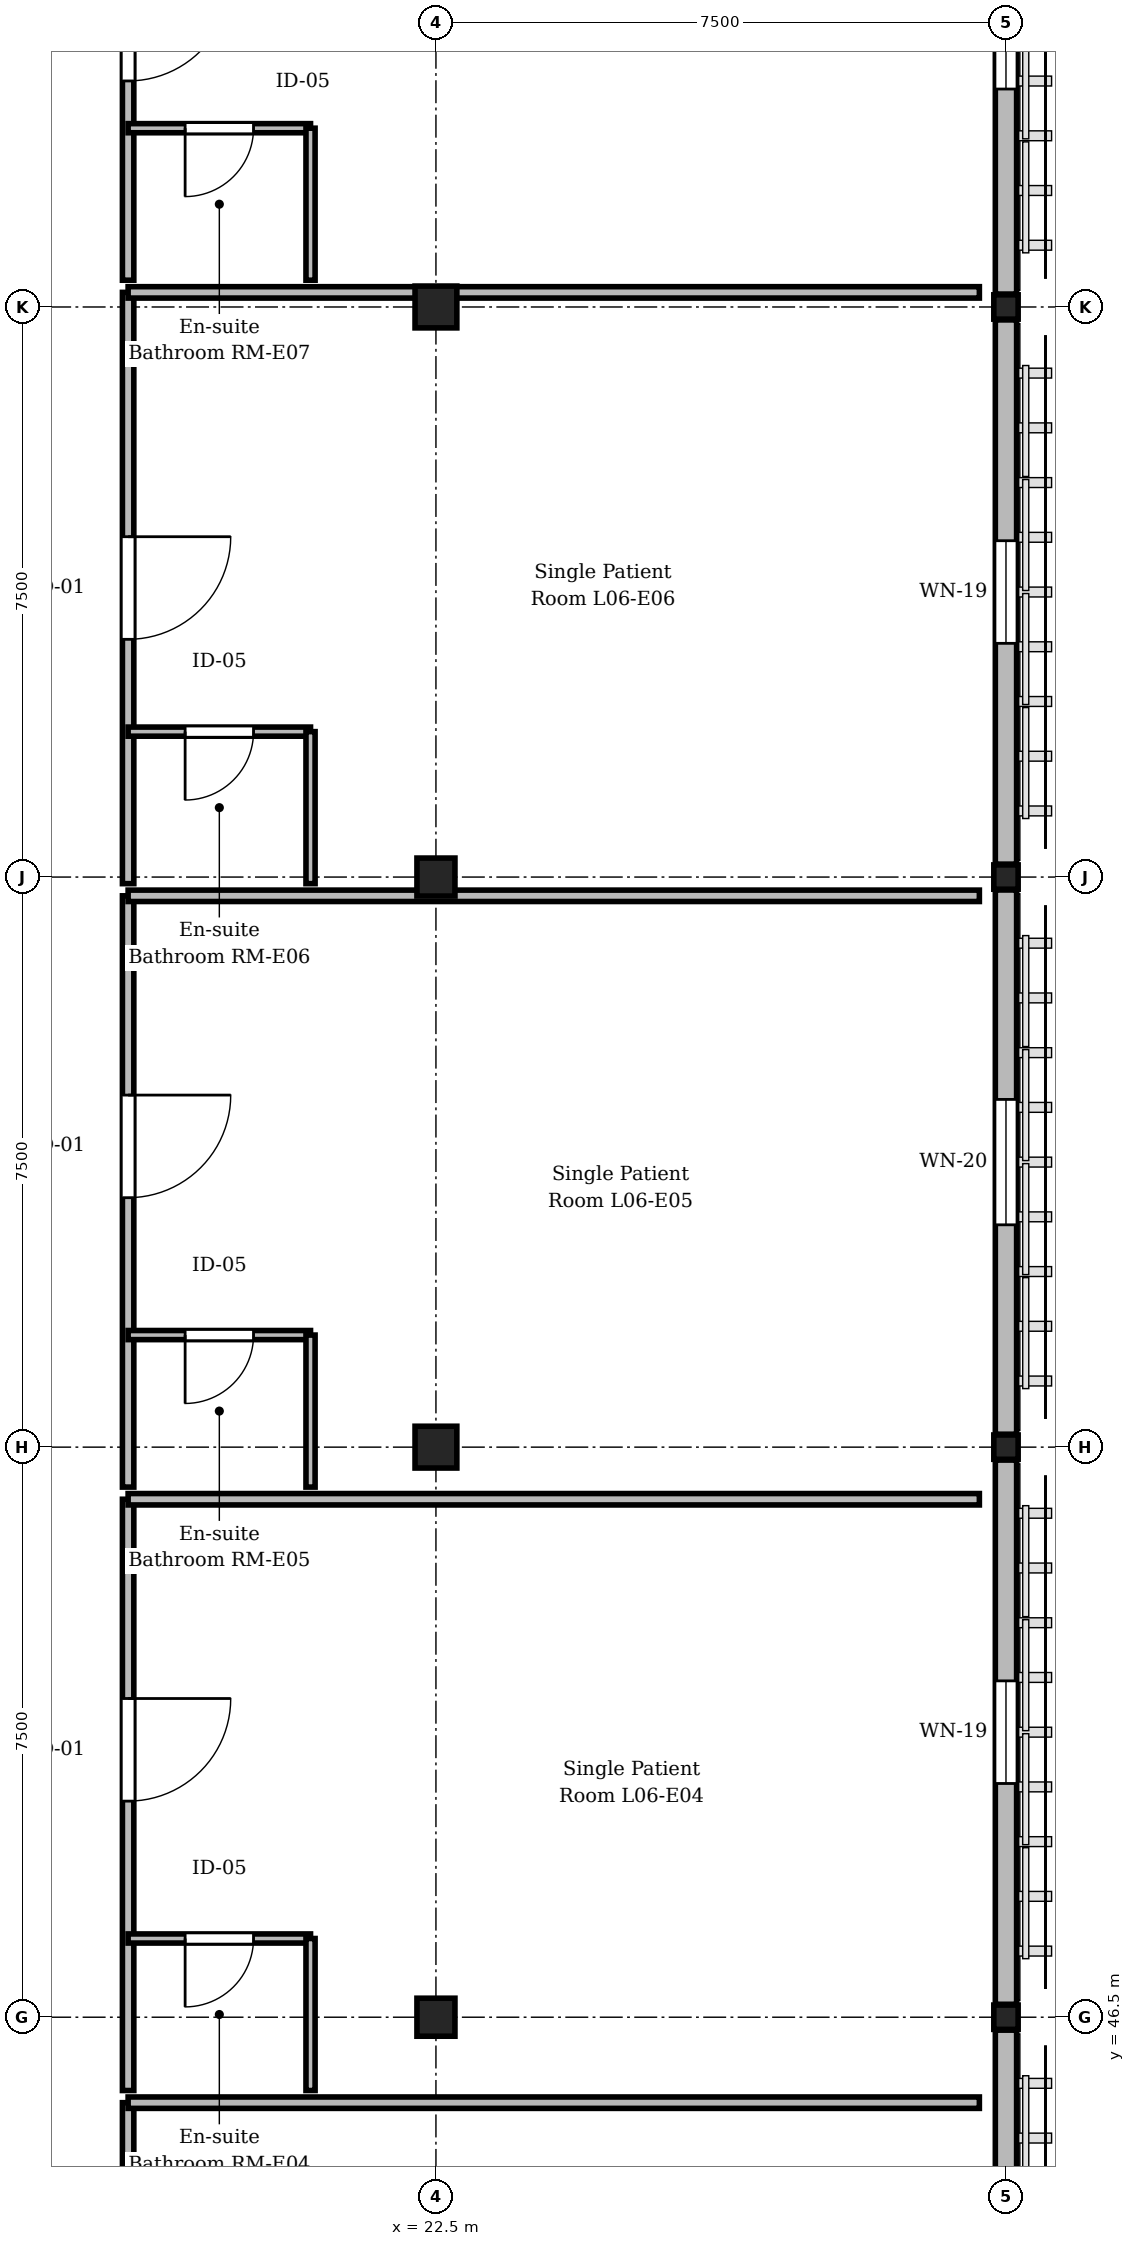
"""IFC4 building model, lengths in metres.
Left out: names, types, materials, properties, quantities, classifications, styles, units other than length and angle.
Written with IfcOpenShell. Run it as: python <this file> out.ifc"""

import sys

from ifc_helpers import new_model, si_unit, direction, frame, frame_2d, origin, origin_2d, place, context, subcontext, project, spatial, rectangle, extrude, element, fill, save


model = new_model("IFC4")
c1 = context("Model", 3, precision=1e-05, world=origin(), true_north=direction((0.0, 1.0)))
c2 = subcontext(c1, "Body", "Model", "MODEL_VIEW")
j1 = project(units=[si_unit("LENGTHUNIT", "METRE"), si_unit("PLANEANGLEUNIT", "RADIAN")], contexts=[c1])
p1 = place(None, origin())
s1 = spatial("IfcSite", under=j1, at=p1, CompositionType="ELEMENT")
p2 = place(p1, origin())
s2 = spatial("IfcBuilding", under=s1, at=p2, CompositionType="ELEMENT")
p3 = place(p2, frame((0.0, 0.0, 25.95)))
s3 = spatial("IfcBuildingStorey", under=s2, at=p3, CompositionType="ELEMENT", Elevation=25.95)
p4 = place(p3, frame((22.5, 46.5, 0.0), z_axis=(0.0, 0.0, 1.0), x_axis=(1.0, 0.0, 0.0)))
e1 = element("IfcColumn", 1, at=p4, inside=s3, PredefinedType="COLUMN", context=c2, shape_type="SweptSolid", body=[
    extrude(rectangle(XDim=0.5, YDim=0.5, at=origin_2d()), origin(), (0.0, 0.0, 1.0), 4.05),
])
p5 = place(p3, frame((22.5, 54.0, 0.0), z_axis=(0.0, 0.0, 1.0), x_axis=(1.0, 0.0, 0.0)))
e2 = element("IfcColumn", 2, at=p5, inside=s3, PredefinedType="COLUMN", context=c2, shape_type="SweptSolid", body=[
    extrude(rectangle(XDim=0.55, YDim=0.55, at=origin_2d()), origin(), (0.0, 0.0, 1.0), 4.05),
])
p6 = place(p3, frame((22.5, 61.5, 0.0), z_axis=(0.0, 0.0, 1.0), x_axis=(1.0, 0.0, 0.0)))
e3 = element("IfcColumn", 3, at=p6, inside=s3, PredefinedType="COLUMN", context=c2, shape_type="SweptSolid", body=[
    extrude(rectangle(XDim=0.5, YDim=0.5, at=origin_2d()), origin(), (0.0, 0.0, 1.0), 4.05),
])
p7 = place(p3, frame((22.5, 69.0, 0.0), z_axis=(0.0, 0.0, 1.0), x_axis=(1.0, 0.0, 0.0)))
e4 = element("IfcColumn", 4, at=p7, inside=s3, PredefinedType="COLUMN", context=c2, shape_type="SweptSolid", body=[
    extrude(rectangle(XDim=0.55, YDim=0.55, at=origin_2d()), origin(), (0.0, 0.0, 1.0), 4.05),
])
for number, where, z_axis, x_axis in (
    (5, (30.0, 46.5, 0.0), (0.0, 0.0, 1.0), (1.0, 0.0, 0.0)),
    (6, (30.0, 54.0, 0.0), (0.0, 0.0, 1.0), (1.0, 0.0, 0.0)),
    (7, (30.0, 61.5, 0.0), (0.0, 0.0, 1.0), (1.0, 0.0, 0.0)),
    (8, (30.0, 69.0, 0.0), (0.0, 0.0, 1.0), (1.0, 0.0, 0.0)),
):
    element("IfcColumn", number, at=place(p3, frame(where, z_axis=z_axis, x_axis=x_axis)), inside=s3, PredefinedType="COLUMN", context=c2, shape_type="SweptSolid", body=[
        extrude(rectangle(XDim=0.32, YDim=0.32, at=origin_2d()), origin(), (0.0, 0.0, 1.0), 4.05),
    ])
p8 = place(p3, frame((30.0, 46.33, 0.0), z_axis=(0.0, 0.0, 1.0), x_axis=(0.0, -1.0, 0.0)))
e9 = element("IfcWall", 9, at=p8, inside=s3, PredefinedType="STANDARD", context=c2, shape_type="SweptSolid", body=[
    extrude(rectangle(XDim=7.16, YDim=0.28, at=frame_2d((3.58, 0.0))), origin(), (0.0, 0.0, 1.0), 3.17),
])
p9 = place(p8, frame((2.755, 0.0, 0.85)))
e10 = element("IfcOpeningElement", 10, at=p9, cuts=e9, PredefinedType="OPENING", context=c2, shape_type="SweptSolid", body=[
    extrude(rectangle(XDim=1.65, YDim=2.04, at=frame_2d((0.825, 1.02))), frame((0.0, 0.15, 0.0), z_axis=(0.0, -1.0, 0.0), x_axis=(1.0, 0.0, 0.0)), (0.0, 0.0, 1.0), 0.3),
])
p10 = place(p3, frame((30.0, 53.83, 0.0), z_axis=(0.0, 0.0, 1.0), x_axis=(0.0, -1.0, 0.0)))
e11 = element("IfcWall", 11, at=p10, inside=s3, PredefinedType="STANDARD", context=c2, shape_type="SweptSolid", body=[
    extrude(rectangle(XDim=7.16, YDim=0.28, at=frame_2d((3.58, 0.0))), origin(), (0.0, 0.0, 1.0), 3.17),
])
p11 = place(p10, frame((2.905, 0.0, 0.85)))
e12 = element("IfcOpeningElement", 12, at=p11, cuts=e11, PredefinedType="OPENING", context=c2, shape_type="SweptSolid", body=[
    extrude(rectangle(XDim=1.35, YDim=2.04, at=frame_2d((0.675, 1.02))), frame((0.0, 0.15, 0.0), z_axis=(0.0, -1.0, 0.0), x_axis=(1.0, 0.0, 0.0)), (0.0, 0.0, 1.0), 0.3),
])
p12 = place(p3, frame((30.0, 61.33, 0.0), z_axis=(0.0, 0.0, 1.0), x_axis=(0.0, -1.0, 0.0)))
e13 = element("IfcWall", 13, at=p12, inside=s3, PredefinedType="STANDARD", context=c2, shape_type="SweptSolid", body=[
    extrude(rectangle(XDim=7.16, YDim=0.28, at=frame_2d((3.58, 0.0))), origin(), (0.0, 0.0, 1.0), 3.17),
])
p13 = place(p12, frame((2.755, 0.0, 0.85)))
e14 = element("IfcOpeningElement", 14, at=p13, cuts=e13, PredefinedType="OPENING", context=c2, shape_type="SweptSolid", body=[
    extrude(rectangle(XDim=1.65, YDim=2.04, at=frame_2d((0.825, 1.02))), frame((0.0, 0.15, 0.0), z_axis=(0.0, -1.0, 0.0), x_axis=(1.0, 0.0, 0.0)), (0.0, 0.0, 1.0), 0.3),
])
p14 = place(p3, frame((30.0, 68.83, 0.0), z_axis=(0.0, 0.0, 1.0), x_axis=(0.0, -1.0, 0.0)))
e15 = element("IfcWall", 15, at=p14, inside=s3, PredefinedType="STANDARD", context=c2, shape_type="SweptSolid", body=[
    extrude(rectangle(XDim=7.16, YDim=0.28, at=frame_2d((3.58, 0.0))), origin(), (0.0, 0.0, 1.0), 3.17),
])
p15 = place(p14, frame((2.905, 0.0, 0.85)))
e16 = element("IfcOpeningElement", 16, at=p15, cuts=e15, PredefinedType="OPENING", context=c2, shape_type="SweptSolid", body=[
    extrude(rectangle(XDim=1.35, YDim=2.04, at=frame_2d((0.675, 1.02))), frame((0.0, 0.15, 0.0), z_axis=(0.0, -1.0, 0.0), x_axis=(1.0, 0.0, 0.0)), (0.0, 0.0, 1.0), 0.3),
])
p16 = place(p3, frame((30.0, 76.215, 0.0), z_axis=(0.0, 0.0, 1.0), x_axis=(0.0, -1.0, 0.0)))
e17 = element("IfcWall", 17, at=p16, inside=s3, PredefinedType="STANDARD", context=c2, shape_type="SweptSolid", body=[
    extrude(rectangle(XDim=7.045, YDim=0.28, at=frame_2d((3.522, 0.0))), origin(), (0.0, 0.0, 1.0), 3.17),
])
p17 = place(p16, frame((2.698, 0.0, 0.85)))
e18 = element("IfcOpeningElement", 18, at=p17, cuts=e17, PredefinedType="OPENING", context=c2, shape_type="SweptSolid", body=[
    extrude(rectangle(XDim=1.65, YDim=2.04, at=frame_2d((0.825, 1.02))), frame((0.0, 0.15, 0.0), z_axis=(0.0, -1.0, 0.0), x_axis=(1.0, 0.0, 0.0)), (0.0, 0.0, 1.0), 0.3),
])
p18 = place(p3, frame((18.45, 45.375, 0.0), z_axis=(0.0, 0.0, 1.0), x_axis=(0.0, -1.0, 0.0)))
e19 = element("IfcWall", 19, at=p18, inside=s3, PredefinedType="PARTITIONING", context=c2, shape_type="SweptSolid", body=[
    extrude(rectangle(XDim=7.779, YDim=0.15, at=frame_2d((3.889, 0.0))), origin(), (0.0, 0.0, 1.0), 3.755),
])
p19 = place(p18, frame((2.029, 0.0, 0.0)))
e20 = element("IfcOpeningElement", 20, at=p19, cuts=e19, PredefinedType="OPENING", context=c2, shape_type="SweptSolid", body=[
    extrude(rectangle(XDim=1.35, YDim=2.25, at=frame_2d((0.675, 1.125))), frame((0.0, 0.085, 0.0), z_axis=(0.0, -1.0, 0.0), x_axis=(1.0, 0.0, 0.0)), (0.0, 0.0, 1.0), 0.17),
])
p20 = place(p3, frame((18.45, 53.314, 0.0), z_axis=(0.0, 0.0, 1.0), x_axis=(0.0, -1.0, 0.0)))
e21 = element("IfcWall", 21, at=p20, inside=s3, PredefinedType="PARTITIONING", context=c2, shape_type="SweptSolid", body=[
    extrude(rectangle(XDim=7.779, YDim=0.15, at=frame_2d((3.889, 0.0))), origin(), (0.0, 0.0, 1.0), 3.755),
])
p21 = place(p20, frame((2.622, 0.0, 0.0)))
e22 = element("IfcOpeningElement", 22, at=p21, cuts=e21, PredefinedType="OPENING", context=c2, shape_type="SweptSolid", body=[
    extrude(rectangle(XDim=1.35, YDim=2.25, at=frame_2d((0.675, 1.125))), frame((0.0, 0.085, 0.0), z_axis=(0.0, -1.0, 0.0), x_axis=(1.0, 0.0, 0.0)), (0.0, 0.0, 1.0), 0.17),
])
p22 = place(p3, frame((20.85, 47.536, 0.0), z_axis=(0.0, 0.0, 1.0), x_axis=(-1.0, 0.0, 0.0)))
e23 = element("IfcWall", 23, at=p22, inside=s3, PredefinedType="PARTITIONING", context=c2, shape_type="SweptSolid", body=[
    extrude(rectangle(XDim=2.4, YDim=0.12, at=frame_2d((1.2, 0.0))), origin(), (0.0, 0.0, 1.0), 3.755),
])
p23 = place(p22, frame((0.75, 0.0, 0.0)))
e24 = element("IfcOpeningElement", 24, at=p23, cuts=e23, PredefinedType="OPENING", context=c2, shape_type="SweptSolid", body=[
    extrude(rectangle(XDim=0.9, YDim=2.1, at=frame_2d((0.45, 1.05))), frame((0.0, 0.07, 0.0), z_axis=(0.0, -1.0, 0.0), x_axis=(1.0, 0.0, 0.0)), (0.0, 0.0, 1.0), 0.14),
])
p24 = place(p3, frame((20.85, 45.536, 0.0), z_axis=(0.0, 0.0, 1.0), x_axis=(0.0, 1.0, 0.0)))
e25 = element("IfcWall", 25, at=p24, inside=s3, PredefinedType="PARTITIONING", context=c2, shape_type="SweptSolid", body=[
    extrude(rectangle(XDim=2.0, YDim=0.12, at=frame_2d((1.0, 0.0))), origin(), (0.0, 0.0, 1.0), 3.755),
])
p25 = place(p3, frame((18.45, 61.253, 0.0), z_axis=(0.0, 0.0, 1.0), x_axis=(0.0, -1.0, 0.0)))
e26 = element("IfcWall", 26, at=p25, inside=s3, PredefinedType="PARTITIONING", context=c2, shape_type="SweptSolid", body=[
    extrude(rectangle(XDim=7.779, YDim=0.15, at=frame_2d((3.89, 0.0))), origin(), (0.0, 0.0, 1.0), 3.755),
])
p26 = place(p25, frame((2.622, 0.0, 0.0)))
e27 = element("IfcOpeningElement", 27, at=p26, cuts=e26, PredefinedType="OPENING", context=c2, shape_type="SweptSolid", body=[
    extrude(rectangle(XDim=1.35, YDim=2.25, at=frame_2d((0.675, 1.125))), frame((0.0, 0.085, 0.0), z_axis=(0.0, -1.0, 0.0), x_axis=(1.0, 0.0, 0.0)), (0.0, 0.0, 1.0), 0.17),
])
p27 = place(p3, frame((20.85, 55.474, 0.0), z_axis=(0.0, 0.0, 1.0), x_axis=(-1.0, 0.0, 0.0)))
e28 = element("IfcWall", 28, at=p27, inside=s3, PredefinedType="PARTITIONING", context=c2, shape_type="SweptSolid", body=[
    extrude(rectangle(XDim=2.4, YDim=0.12, at=frame_2d((1.2, 0.0))), origin(), (0.0, 0.0, 1.0), 3.755),
])
p28 = place(p27, frame((0.75, 0.0, 0.0)))
e29 = element("IfcOpeningElement", 29, at=p28, cuts=e28, PredefinedType="OPENING", context=c2, shape_type="SweptSolid", body=[
    extrude(rectangle(XDim=0.9, YDim=2.1, at=frame_2d((0.45, 1.05))), frame((0.0, 0.07, 0.0), z_axis=(0.0, -1.0, 0.0), x_axis=(1.0, 0.0, 0.0)), (0.0, 0.0, 1.0), 0.14),
])
p29 = place(p3, frame((20.85, 53.474, 0.0), z_axis=(0.0, 0.0, 1.0), x_axis=(0.0, 1.0, 0.0)))
e30 = element("IfcWall", 30, at=p29, inside=s3, PredefinedType="PARTITIONING", context=c2, shape_type="SweptSolid", body=[
    extrude(rectangle(XDim=2.0, YDim=0.12, at=frame_2d((1.0, 0.0))), origin(), (0.0, 0.0, 1.0), 3.755),
])
p30 = place(p3, frame((18.45, 69.192, 0.0), z_axis=(0.0, 0.0, 1.0), x_axis=(0.0, -1.0, 0.0)))
e31 = element("IfcWall", 31, at=p30, inside=s3, PredefinedType="PARTITIONING", context=c2, shape_type="SweptSolid", body=[
    extrude(rectangle(XDim=7.779, YDim=0.15, at=frame_2d((3.889, 0.0))), origin(), (0.0, 0.0, 1.0), 3.755),
])
p31 = place(p30, frame((3.215, 0.0, 0.0)))
e32 = element("IfcOpeningElement", 32, at=p31, cuts=e31, PredefinedType="OPENING", context=c2, shape_type="SweptSolid", body=[
    extrude(rectangle(XDim=1.35, YDim=2.25, at=frame_2d((0.675, 1.125))), frame((0.0, 0.085, 0.0), z_axis=(0.0, -1.0, 0.0), x_axis=(1.0, 0.0, 0.0)), (0.0, 0.0, 1.0), 0.17),
])
p32 = place(p3, frame((20.85, 63.413, 0.0), z_axis=(0.0, 0.0, 1.0), x_axis=(-1.0, 0.0, 0.0)))
e33 = element("IfcWall", 33, at=p32, inside=s3, PredefinedType="PARTITIONING", context=c2, shape_type="SweptSolid", body=[
    extrude(rectangle(XDim=2.4, YDim=0.12, at=frame_2d((1.2, 0.0))), origin(), (0.0, 0.0, 1.0), 3.755),
])
p33 = place(p32, frame((0.75, 0.0, 0.0)))
e34 = element("IfcOpeningElement", 34, at=p33, cuts=e33, PredefinedType="OPENING", context=c2, shape_type="SweptSolid", body=[
    extrude(rectangle(XDim=0.9, YDim=2.1, at=frame_2d((0.45, 1.05))), frame((0.0, 0.07, 0.0), z_axis=(0.0, -1.0, 0.0), x_axis=(1.0, 0.0, 0.0)), (0.0, 0.0, 1.0), 0.14),
])
p34 = place(p3, frame((20.85, 61.413, 0.0), z_axis=(0.0, 0.0, 1.0), x_axis=(0.0, 1.0, 0.0)))
e35 = element("IfcWall", 35, at=p34, inside=s3, PredefinedType="PARTITIONING", context=c2, shape_type="SweptSolid", body=[
    extrude(rectangle(XDim=2.0, YDim=0.12, at=frame_2d((1.0, 0.0))), origin(), (0.0, 0.0, 1.0), 3.755),
])
p35 = place(p3, frame((18.45, 77.131, 0.0), z_axis=(0.0, 0.0, 1.0), x_axis=(0.0, -1.0, 0.0)))
e36 = element("IfcWall", 36, at=p35, inside=s3, PredefinedType="PARTITIONING", context=c2, shape_type="SweptSolid", body=[
    extrude(rectangle(XDim=7.779, YDim=0.15, at=frame_2d((3.889, 0.0))), origin(), (0.0, 0.0, 1.0), 3.355),
])
p36 = place(p35, frame((3.807, 0.0, 0.0)))
e37 = element("IfcOpeningElement", 37, at=p36, cuts=e36, PredefinedType="OPENING", context=c2, shape_type="SweptSolid", body=[
    extrude(rectangle(XDim=1.35, YDim=2.25, at=frame_2d((0.675, 1.125))), frame((0.0, 0.085, 0.0), z_axis=(0.0, -1.0, 0.0), x_axis=(1.0, 0.0, 0.0)), (0.0, 0.0, 1.0), 0.17),
])
p37 = place(p3, frame((20.85, 71.352, 0.0), z_axis=(0.0, 0.0, 1.0), x_axis=(-1.0, 0.0, 0.0)))
e38 = element("IfcWall", 38, at=p37, inside=s3, PredefinedType="PARTITIONING", context=c2, shape_type="SweptSolid", body=[
    extrude(rectangle(XDim=2.4, YDim=0.12, at=frame_2d((1.2, 0.0))), origin(), (0.0, 0.0, 1.0), 3.755),
])
p38 = place(p37, frame((0.75, 0.0, 0.0)))
e39 = element("IfcOpeningElement", 39, at=p38, cuts=e38, PredefinedType="OPENING", context=c2, shape_type="SweptSolid", body=[
    extrude(rectangle(XDim=0.9, YDim=2.1, at=frame_2d((0.45, 1.05))), frame((0.0, 0.07, 0.0), z_axis=(0.0, -1.0, 0.0), x_axis=(1.0, 0.0, 0.0)), (0.0, 0.0, 1.0), 0.14),
])
p39 = place(p3, frame((20.85, 69.352, 0.0), z_axis=(0.0, 0.0, 1.0), x_axis=(0.0, 1.0, 0.0)))
e40 = element("IfcWall", 40, at=p39, inside=s3, PredefinedType="PARTITIONING", context=c2, shape_type="SweptSolid", body=[
    extrude(rectangle(XDim=2.0, YDim=0.12, at=frame_2d((1.0, 0.0))), origin(), (0.0, 0.0, 1.0), 3.755),
])
for number, where, z_axis, x_axis in (
    (41, (18.45, 45.375, 0.0), (0.0, 0.0, 1.0), (1.0, 0.0, 0.0)),
    (42, (18.45, 53.314, 0.0), (0.0, 0.0, 1.0), (1.0, 0.0, 0.0)),
):
    element("IfcWall", number, at=place(p3, frame(where, z_axis=z_axis, x_axis=x_axis)), inside=s3, PredefinedType="PARTITIONING", context=c2, shape_type="SweptSolid", body=[
        extrude(rectangle(XDim=11.2, YDim=0.15, at=frame_2d((5.6, 0.0))), origin(), (0.0, 0.0, 1.0), 3.755),
    ])
for number, where, z_axis, x_axis in (
    (43, (18.45, 61.253, 0.0), (0.0, 0.0, 1.0), (1.0, 0.0, 0.0)),
    (44, (18.45, 69.192, 0.0), (0.0, 0.0, 1.0), (1.0, 0.0, 0.0)),
):
    element("IfcWall", number, at=place(p3, frame(where, z_axis=z_axis, x_axis=x_axis)), inside=s3, PredefinedType="PARTITIONING", context=c2, shape_type="SweptSolid", body=[
        extrude(rectangle(XDim=11.2, YDim=0.15, at=frame_2d((5.6, 0.0))), origin(), (0.0, 0.0, 1.0), 3.155),
    ])
p40 = place(p11, origin())
e45 = element("IfcWindow", 45, at=p40, inside=s3, PartitioningType="SINGLE_PANEL", PredefinedType="WINDOW", context=c2, shape_type="SweptSolid", body=[
    extrude(rectangle(XDim=1.35, YDim=2.04, at=frame_2d((0.675, 1.02))), frame((0.0, 0.03, 0.0), z_axis=(0.0, -1.0, 0.0), x_axis=(1.0, 0.0, 0.0)), (0.0, 0.0, 1.0), 0.06),
])
fill(e12, e45)
p41 = place(p13, origin())
e46 = element("IfcWindow", 46, at=p41, inside=s3, PartitioningType="SINGLE_PANEL", PredefinedType="WINDOW", context=c2, shape_type="SweptSolid", body=[
    extrude(rectangle(XDim=1.65, YDim=2.04, at=frame_2d((0.825, 1.02))), frame((0.0, 0.03, 0.0), z_axis=(0.0, -1.0, 0.0), x_axis=(1.0, 0.0, 0.0)), (0.0, 0.0, 1.0), 0.06),
])
fill(e14, e46)
p42 = place(p15, origin())
e47 = element("IfcWindow", 47, at=p42, inside=s3, PartitioningType="SINGLE_PANEL", PredefinedType="WINDOW", context=c2, shape_type="SweptSolid", body=[
    extrude(rectangle(XDim=1.35, YDim=2.04, at=frame_2d((0.675, 1.02))), frame((0.0, 0.03, 0.0), z_axis=(0.0, -1.0, 0.0), x_axis=(1.0, 0.0, 0.0)), (0.0, 0.0, 1.0), 0.06),
])
fill(e16, e47)
p43 = place(p17, origin())
e48 = element("IfcWindow", 48, at=p43, inside=s3, PartitioningType="SINGLE_PANEL", PredefinedType="WINDOW", context=c2, shape_type="SweptSolid", body=[
    extrude(rectangle(XDim=1.65, YDim=2.04, at=frame_2d((0.825, 1.02))), frame((0.0, 0.03, 0.0), z_axis=(0.0, -1.0, 0.0), x_axis=(1.0, 0.0, 0.0)), (0.0, 0.0, 1.0), 0.06),
])
fill(e18, e48)
p44 = place(p21, origin())
e49 = element("IfcDoor", 49, at=p44, inside=s3, OperationType="SINGLE_SWING_LEFT", PredefinedType="DOOR", context=c2, shape_type="SweptSolid", body=[
    extrude(rectangle(XDim=1.35, YDim=2.25, at=frame_2d((0.675, 1.125))), frame((0.0, 0.025, 0.0), z_axis=(0.0, -1.0, 0.0), x_axis=(1.0, 0.0, 0.0)), (0.0, 0.0, 1.0), 0.05),
])
fill(e22, e49)
p45 = place(p23, origin())
e50 = element("IfcDoor", 50, at=p45, inside=s3, OperationType="SINGLE_SWING_RIGHT", PredefinedType="DOOR", context=c2, shape_type="SweptSolid", body=[
    extrude(rectangle(XDim=0.9, YDim=2.1, at=frame_2d((0.45, 1.05))), frame((0.0, 0.025, 0.0), z_axis=(0.0, -1.0, 0.0), x_axis=(1.0, 0.0, 0.0)), (0.0, 0.0, 1.0), 0.05),
])
fill(e24, e50)
p46 = place(p26, origin())
e51 = element("IfcDoor", 51, at=p46, inside=s3, OperationType="SINGLE_SWING_LEFT", PredefinedType="DOOR", context=c2, shape_type="SweptSolid", body=[
    extrude(rectangle(XDim=1.35, YDim=2.25, at=frame_2d((0.675, 1.125))), frame((0.0, 0.025, 0.0), z_axis=(0.0, -1.0, 0.0), x_axis=(1.0, 0.0, 0.0)), (0.0, 0.0, 1.0), 0.05),
])
fill(e27, e51)
p47 = place(p28, origin())
e52 = element("IfcDoor", 52, at=p47, inside=s3, OperationType="SINGLE_SWING_RIGHT", PredefinedType="DOOR", context=c2, shape_type="SweptSolid", body=[
    extrude(rectangle(XDim=0.9, YDim=2.1, at=frame_2d((0.45, 1.05))), frame((0.0, 0.025, 0.0), z_axis=(0.0, -1.0, 0.0), x_axis=(1.0, 0.0, 0.0)), (0.0, 0.0, 1.0), 0.05),
])
fill(e29, e52)
p48 = place(p31, origin())
e53 = element("IfcDoor", 53, at=p48, inside=s3, OperationType="SINGLE_SWING_LEFT", PredefinedType="DOOR", context=c2, shape_type="SweptSolid", body=[
    extrude(rectangle(XDim=1.35, YDim=2.25, at=frame_2d((0.675, 1.125))), frame((0.0, 0.025, 0.0), z_axis=(0.0, -1.0, 0.0), x_axis=(1.0, 0.0, 0.0)), (0.0, 0.0, 1.0), 0.05),
])
fill(e32, e53)
p49 = place(p33, origin())
e54 = element("IfcDoor", 54, at=p49, inside=s3, OperationType="SINGLE_SWING_RIGHT", PredefinedType="DOOR", context=c2, shape_type="SweptSolid", body=[
    extrude(rectangle(XDim=0.9, YDim=2.1, at=frame_2d((0.45, 1.05))), frame((0.0, 0.025, 0.0), z_axis=(0.0, -1.0, 0.0), x_axis=(1.0, 0.0, 0.0)), (0.0, 0.0, 1.0), 0.05),
])
fill(e34, e54)
p50 = place(p36, origin())
e55 = element("IfcDoor", 55, at=p50, inside=s3, OperationType="SINGLE_SWING_LEFT", PredefinedType="DOOR", context=c2, shape_type="SweptSolid", body=[
    extrude(rectangle(XDim=1.35, YDim=2.25, at=frame_2d((0.675, 1.125))), frame((0.0, 0.025, 0.0), z_axis=(0.0, -1.0, 0.0), x_axis=(1.0, 0.0, 0.0)), (0.0, 0.0, 1.0), 0.05),
])
fill(e37, e55)
p51 = place(p38, origin())
e56 = element("IfcDoor", 56, at=p51, inside=s3, OperationType="SINGLE_SWING_RIGHT", PredefinedType="DOOR", context=c2, shape_type="SweptSolid", body=[
    extrude(rectangle(XDim=0.9, YDim=2.1, at=frame_2d((0.45, 1.05))), frame((0.0, 0.025, 0.0), z_axis=(0.0, -1.0, 0.0), x_axis=(1.0, 0.0, 0.0)), (0.0, 0.0, 1.0), 0.05),
])
fill(e39, e56)
save(model, sys.argv[1])
